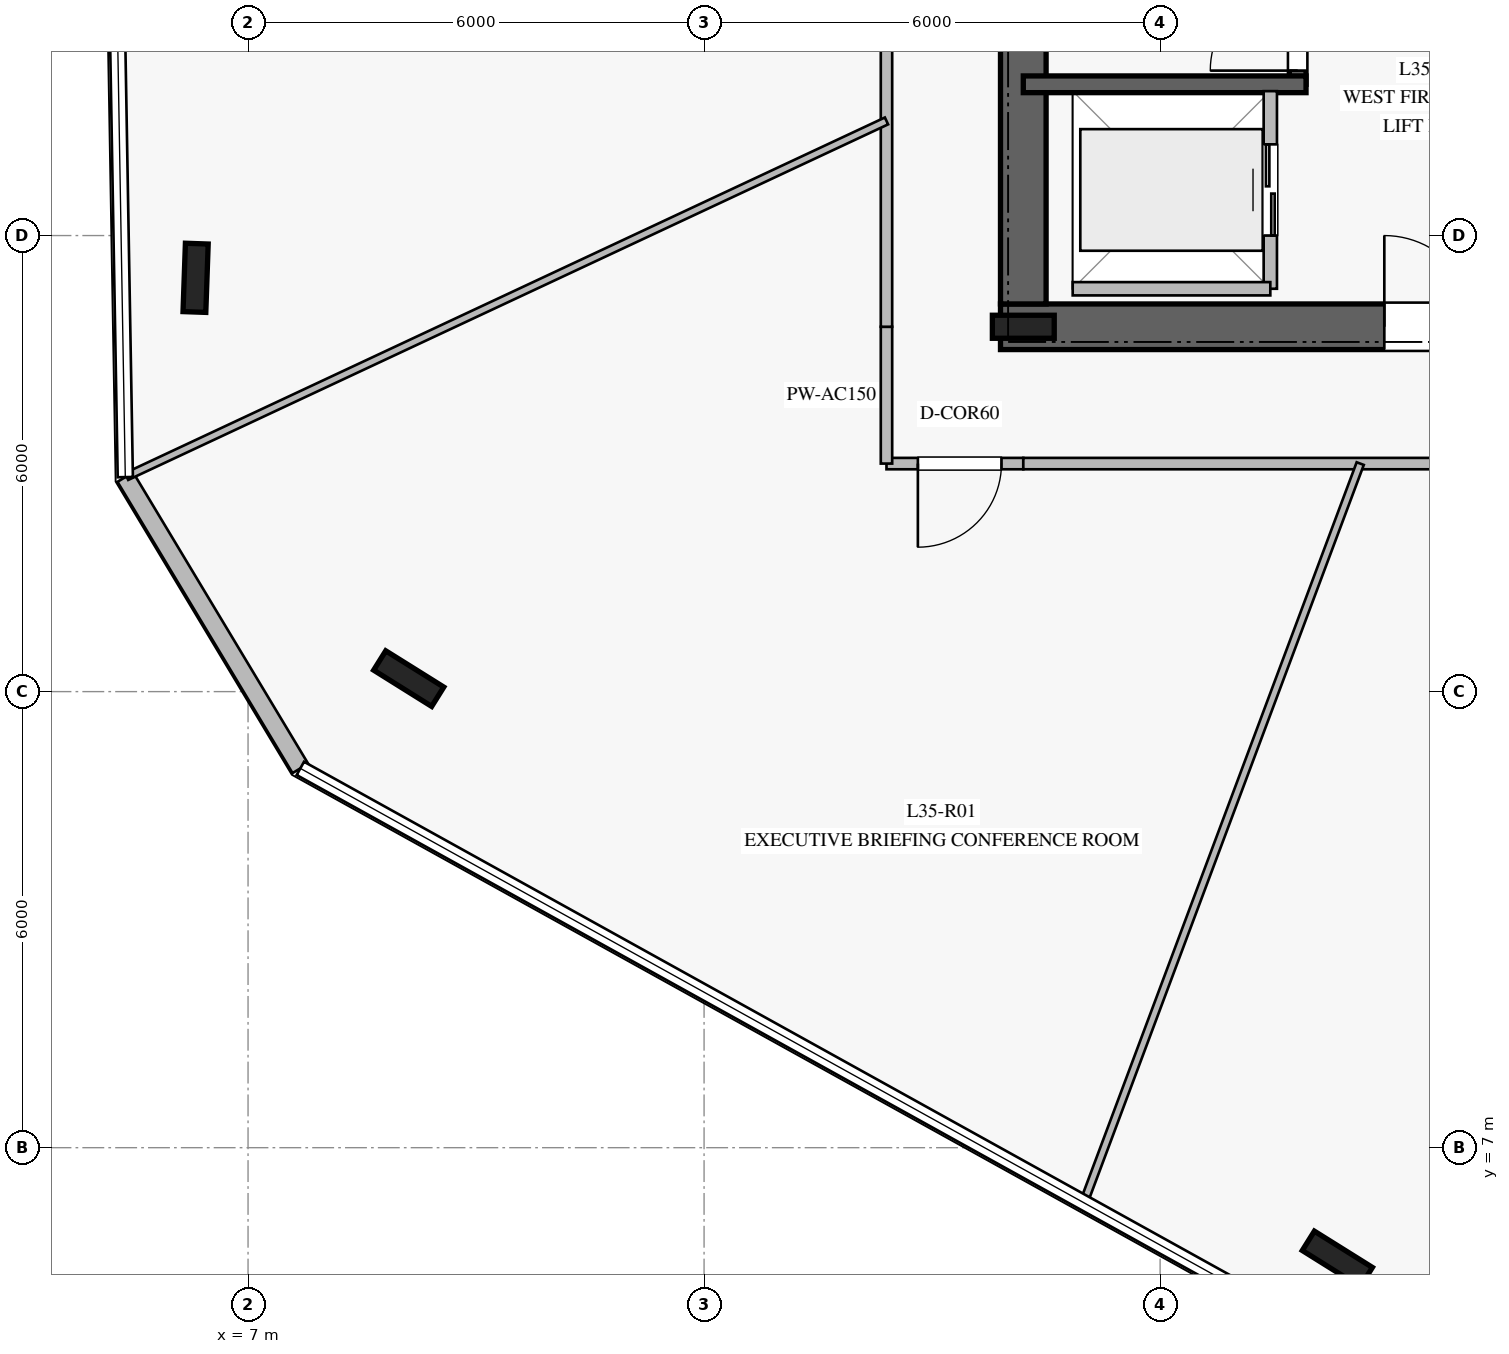
"""IFC4 building model, lengths in metres.
Left out: names, types, materials, properties, quantities, classifications, styles, units other than length and angle.
Written with IfcOpenShell. Run it as: python <this file> out.ifc"""

import sys

from ifc_helpers import new_model, si_unit, direction, frame, frame_2d, origin, origin_2d, place, context, subcontext, project, spatial, rectangle, i_section, extrude, element, fill, save


model = new_model("IFC4")
c1 = context("Model", 3, precision=1e-05, world=origin(), true_north=direction((0.0, 1.0)))
c2 = subcontext(c1, "Body", "Model", "MODEL_VIEW")
j1 = project(units=[si_unit("LENGTHUNIT", "METRE"), si_unit("PLANEANGLEUNIT", "RADIAN")], contexts=[c1])
p1 = place(None, origin())
s1 = spatial("IfcSite", under=j1, at=p1, CompositionType="ELEMENT")
p2 = place(p1, origin())
s2 = spatial("IfcBuilding", under=s1, at=p2, CompositionType="ELEMENT")
p3 = place(p2, frame((0.0, 0.0, 146.4)))
s3 = spatial("IfcBuildingStorey", under=s2, at=p3, CompositionType="ELEMENT", Elevation=146.4)
p4 = place(p3, frame((16.9, 17.8, 0.0), z_axis=(0.0, 0.0, 1.0), x_axis=(1.0, 0.0, 0.0)))
e1 = element("IfcWall", 1, at=p4, inside=s3, PredefinedType="SHEAR", context=c2, shape_type="SweptSolid", body=[
    extrude(rectangle(XDim=16.2, YDim=0.6, at=frame_2d((8.1, 0.0))), origin(), (0.0, 0.0, 1.0), 3.76),
])
p5 = place(p4, frame((5.05, 0.0, 0.0)))
e2 = element("IfcOpeningElement", 2, at=p5, cuts=e1, PredefinedType="OPENING", context=c2, shape_type="SweptSolid", body=[
    extrude(rectangle(XDim=1.2, YDim=2.25, at=frame_2d((0.6, 1.125))), frame((0.0, 0.31, 0.0), z_axis=(0.0, -1.0, 0.0), x_axis=(1.0, 0.0, 0.0)), (0.0, 0.0, 1.0), 0.62),
])
p6 = place(p4, frame((14.0, 0.0, 0.0)))
e3 = element("IfcOpeningElement", 3, at=p6, cuts=e1, PredefinedType="OPENING", context=c2, shape_type="SweptSolid", body=[
    extrude(rectangle(XDim=0.9, YDim=2.1, at=frame_2d((0.45, 1.05))), frame((0.0, 0.31, 0.0), z_axis=(0.0, -1.0, 0.0), x_axis=(1.0, 0.0, 0.0)), (0.0, 0.0, 1.0), 0.62),
])
p7 = place(p4, frame((9.25, 0.0, 0.0)))
e4 = element("IfcOpeningElement", 4, at=p7, cuts=e1, PredefinedType="OPENING", context=c2, shape_type="SweptSolid", body=[
    extrude(rectangle(XDim=1.1, YDim=2.2, at=frame_2d((0.55, 1.1))), frame((0.0, 0.31, 0.0), z_axis=(0.0, -1.0, 0.0), x_axis=(1.0, 0.0, 0.0)), (0.0, 0.0, 1.0), 0.62),
])
p8 = place(p3, frame((17.2, 31.9, 0.0), z_axis=(0.0, 0.0, 1.0), x_axis=(0.0, -1.0, 0.0)))
e5 = element("IfcWall", 5, at=p8, inside=s3, PredefinedType="SHEAR", context=c2, shape_type="SweptSolid", body=[
    extrude(rectangle(XDim=13.8, YDim=0.6, at=frame_2d((6.9, 0.0))), origin(), (0.0, 0.0, 1.0), 3.76),
])
p9 = place(p8, frame((2.05, 0.0, 0.0)))
e6 = element("IfcOpeningElement", 6, at=p9, cuts=e5, PredefinedType="OPENING", context=c2, shape_type="SweptSolid", body=[
    extrude(rectangle(XDim=1.5, YDim=2.2, at=frame_2d((0.75, 1.1))), frame((0.0, 0.31, 0.0), z_axis=(0.0, -1.0, 0.0), x_axis=(1.0, 0.0, 0.0)), (0.0, 0.0, 1.0), 0.62),
])
p10 = place(p3, frame((17.2, 17.8, 0.0), z_axis=(0.0, 0.0, 1.0), x_axis=(1.0, 0.0, 0.0)))
e7 = element("IfcColumn", 7, at=p10, inside=s3, PredefinedType="COLUMN", context=c2, shape_type="SweptSolid", body=[
    extrude(i_section(OverallWidth=0.303, OverallDepth=0.814, WebThickness=0.021, FlangeThickness=0.04, at=origin_2d()), origin(), (0.0, 0.0, 1.0), 4.0),
])
p11 = place(p3, frame((20.81, 20.99, 0.0), z_axis=(0.0, 0.0, 1.0), x_axis=(0.0, 1.0, 0.0)))
e8 = element("IfcWall", 8, at=p11, inside=s3, PredefinedType="SOLIDWALL", context=c2, shape_type="SweptSolid", body=[
    extrude(rectangle(XDim=7.22, YDim=0.22, at=frame_2d((3.61, 0.0))), origin(), (0.0, 0.0, 1.0), 3.76),
])
p12 = place(p11, frame((0.18, 0.0, 0.0)))
e9 = element("IfcOpeningElement", 9, at=p12, cuts=e8, PredefinedType="OPENING", context=c2, shape_type="SweptSolid", body=[
    extrude(rectangle(XDim=1.15, YDim=2.2, at=frame_2d((0.575, 1.1))), frame((0.0, 0.12, 0.0), z_axis=(0.0, -1.0, 0.0), x_axis=(1.0, 0.0, 0.0)), (0.0, 0.0, 1.0), 0.24),
])
p13 = place(p3, frame((17.2, 20.99, 0.0), z_axis=(0.0, 0.0, 1.0), x_axis=(1.0, 0.0, 0.0)))
e10 = element("IfcWall", 10, at=p13, inside=s3, PredefinedType="SOLIDWALL", context=c2, shape_type="SweptSolid", body=[
    extrude(rectangle(XDim=3.72, YDim=0.22, at=frame_2d((1.86, 0.0))), origin(), (0.0, 0.0, 1.0), 3.76),
])
for number, where, z_axis, x_axis in (
    (11, (6.31, 18.444, 0.0), (0.0, 0.0, 1.0), (0.035, 0.999, 0.0)),
    (12, (9.114, 13.171, 0.0), (0.0, 0.0, 1.0), (-0.848, 0.53, 0.0)),
    (13, (21.332, 5.536, 0.0), (0.0, 0.0, 1.0), (-0.848, 0.53, 0.0)),
):
    element("IfcColumn", number, at=place(p3, frame(where, z_axis=z_axis, x_axis=x_axis)), inside=s3, PredefinedType="COLUMN", context=c2, shape_type="SweptSolid", body=[
        extrude(i_section(OverallWidth=0.3, OverallDepth=0.9, WebThickness=0.019, FlangeThickness=0.035, at=origin_2d()), origin(), (0.0, 0.0, 1.0), 4.0),
    ])
p14 = place(p3, frame((5.385, 15.822, 0.0), z_axis=(0.0, 0.0, 1.0), x_axis=(0.515113973, -0.857121691955, 0.0)))
e14 = element("IfcWall", 14, at=p14, inside=s3, PredefinedType="STANDARD", context=c2, shape_type="SweptSolid", body=[
    extrude(rectangle(XDim=4.471, YDim=0.24, at=frame_2d((2.235, 0.0))), origin(), (0.0, 0.0, 1.0), 3.76),
])
p15 = place(p3, frame((20.45, 18.3, 0.0), z_axis=(0.0, 0.0, 1.0), x_axis=(0.0, 1.0, 0.0)))
e15 = element("IfcWall", 15, at=p15, inside=s3, PredefinedType="PARTITIONING", context=c2, shape_type="SweptSolid", body=[
    extrude(rectangle(XDim=2.6, YDim=0.175, at=frame_2d((1.3, 0.0))), origin(), (0.0, 0.0, 1.0), 3.76),
])
p16 = place(p15, frame((0.7, 0.0, 0.0)))
e16 = element("IfcOpeningElement", 16, at=p16, cuts=e15, PredefinedType="OPENING", context=c2, shape_type="SweptSolid", body=[
    extrude(rectangle(XDim=1.2, YDim=2.2, at=frame_2d((0.6, 1.1))), frame((0.0, 0.098, 0.0), z_axis=(0.0, -1.0, 0.0), x_axis=(1.0, 0.0, 0.0)), (0.0, 0.0, 1.0), 0.195),
])
p17 = place(p3, frame((17.85, 18.3, 0.0), z_axis=(0.0, 0.0, 1.0), x_axis=(1.0, 0.0, 0.0)))
e17 = element("IfcWall", 17, at=p17, inside=s3, PredefinedType="PARTITIONING", context=c2, shape_type="SweptSolid", body=[
    extrude(rectangle(XDim=2.6, YDim=0.175, at=frame_2d((1.3, 0.0))), origin(), (0.0, 0.0, 1.0), 3.76),
])
p18 = place(p3, frame((17.2, 16.0, 0.0), z_axis=(0.0, 0.0, 1.0), x_axis=(-1.0, 0.0, 0.0)))
e18 = element("IfcWall", 18, at=p18, inside=s3, PredefinedType="PARTITIONING", context=c2, shape_type="SweptSolid", body=[
    extrude(rectangle(XDim=1.8, YDim=0.15, at=frame_2d((0.9, 0.0))), origin(), (0.0, 0.0, 1.0), 3.36),
])
p19 = place(p18, frame((0.287, 0.0, 0.0)))
e19 = element("IfcOpeningElement", 19, at=p19, cuts=e18, PredefinedType="OPENING", context=c2, shape_type="SweptSolid", body=[
    extrude(rectangle(XDim=1.1, YDim=2.2, at=frame_2d((0.55, 1.1))), frame((0.0, 0.085, 0.0), z_axis=(0.0, -1.0, 0.0), x_axis=(1.0, 0.0, 0.0)), (0.0, 0.0, 1.0), 0.17),
])
p20 = place(p3, frame((15.4, 16.0, 0.0), z_axis=(0.0, 0.0, 1.0), x_axis=(0.0, 1.0, 0.0)))
e20 = element("IfcWall", 20, at=p20, inside=s3, PredefinedType="PARTITIONING", context=c2, shape_type="SweptSolid", body=[
    extrude(rectangle(XDim=1.8, YDim=0.15, at=frame_2d((0.9, 0.0))), origin(), (0.0, 0.0, 1.0), 3.21),
])
p21 = place(p3, frame((15.4, 17.8, 0.0), z_axis=(0.0, 0.0, 1.0), x_axis=(0.0, 1.0, 0.0)))
e21 = element("IfcWall", 21, at=p21, inside=s3, PredefinedType="PARTITIONING", context=c2, shape_type="SweptSolid", body=[
    extrude(rectangle(XDim=6.25, YDim=0.15, at=frame_2d((3.125, 0.0))), origin(), (0.0, 0.0, 1.0), 3.21),
])
p22 = place(p21, frame((3.73, 0.0, 0.0)))
e22 = element("IfcOpeningElement", 22, at=p22, cuts=e21, PredefinedType="OPENING", context=c2, shape_type="SweptSolid", body=[
    extrude(rectangle(XDim=1.1, YDim=2.2, at=frame_2d((0.55, 1.1))), frame((0.0, 0.085, 0.0), z_axis=(0.0, -1.0, 0.0), x_axis=(1.0, 0.0, 0.0)), (0.0, 0.0, 1.0), 0.17),
])
p23 = place(p3, frame((24.05, 16.0, 0.0), z_axis=(0.0, 0.0, 1.0), x_axis=(-1.0, 0.0, 0.0)))
e23 = element("IfcWall", 23, at=p23, inside=s3, PredefinedType="PARTITIONING", context=c2, shape_type="SweptSolid", body=[
    extrude(rectangle(XDim=6.85, YDim=0.15, at=frame_2d((3.425, 0.0))), origin(), (0.0, 0.0, 1.0), 3.21),
])
p24 = place(p3, frame((15.4, 20.508, 0.0), z_axis=(0.0, 0.0, 1.0), x_axis=(-0.905754360865, -0.423803064847, 0.0)))
e24 = element("IfcWall", 24, at=p24, inside=s3, PredefinedType="MOVABLE", context=c2, shape_type="SweptSolid", body=[
    extrude(rectangle(XDim=11.038, YDim=0.1, at=frame_2d((5.519, 0.0))), origin(), (0.0, 0.0, 1.0), 3.16),
])
p25 = place(p3, frame((21.633, 16.0, 0.0), z_axis=(0.0, 0.0, 1.0), x_axis=(-0.350441839508, -0.936584495453, 0.0)))
e25 = element("IfcWall", 25, at=p25, inside=s3, PredefinedType="MOVABLE", context=c2, shape_type="SweptSolid", body=[
    extrude(rectangle(XDim=10.364, YDim=0.1, at=frame_2d((5.182, 0.0))), origin(), (0.0, 0.0, 1.0), 3.16),
])
p26 = place(p12, origin())
e26 = element("IfcDoor", 26, at=p26, inside=s3, OperationType="SINGLE_SWING_LEFT", PredefinedType="DOOR", context=c2, shape_type="SweptSolid", body=[
    extrude(rectangle(XDim=1.15, YDim=2.2, at=frame_2d((0.575, 1.1))), frame((0.0, 0.025, 0.0), z_axis=(0.0, -1.0, 0.0), x_axis=(1.0, 0.0, 0.0)), (0.0, 0.0, 1.0), 0.05),
])
fill(e9, e26)
p27 = place(p5, origin())
e27 = element("IfcDoor", 27, at=p27, inside=s3, OperationType="SINGLE_SWING_LEFT", PredefinedType="DOOR", context=c2, shape_type="SweptSolid", body=[
    extrude(rectangle(XDim=1.2, YDim=2.25, at=frame_2d((0.6, 1.125))), frame((0.0, 0.025, 0.0), z_axis=(0.0, -1.0, 0.0), x_axis=(1.0, 0.0, 0.0)), (0.0, 0.0, 1.0), 0.05),
])
fill(e2, e27)
p28 = place(p16, origin())
e28 = element("IfcDoor", 28, at=p28, inside=s3, OperationType="DOUBLE_DOOR_SLIDING", PredefinedType="DOOR", context=c2, shape_type="SweptSolid", body=[
    extrude(rectangle(XDim=1.2, YDim=2.2, at=frame_2d((0.6, 1.1))), frame((0.0, 0.025, 0.0), z_axis=(0.0, -1.0, 0.0), x_axis=(1.0, 0.0, 0.0)), (0.0, 0.0, 1.0), 0.05),
])
fill(e16, e28)
p29 = place(p19, origin())
e29 = element("IfcDoor", 29, at=p29, inside=s3, OperationType="SINGLE_SWING_RIGHT", PredefinedType="DOOR", context=c2, shape_type="SweptSolid", body=[
    extrude(rectangle(XDim=1.1, YDim=2.2, at=frame_2d((0.55, 1.1))), frame((0.0, 0.025, 0.0), z_axis=(0.0, -1.0, 0.0), x_axis=(1.0, 0.0, 0.0)), (0.0, 0.0, 1.0), 0.05),
])
fill(e19, e29)
save(model, sys.argv[1])
